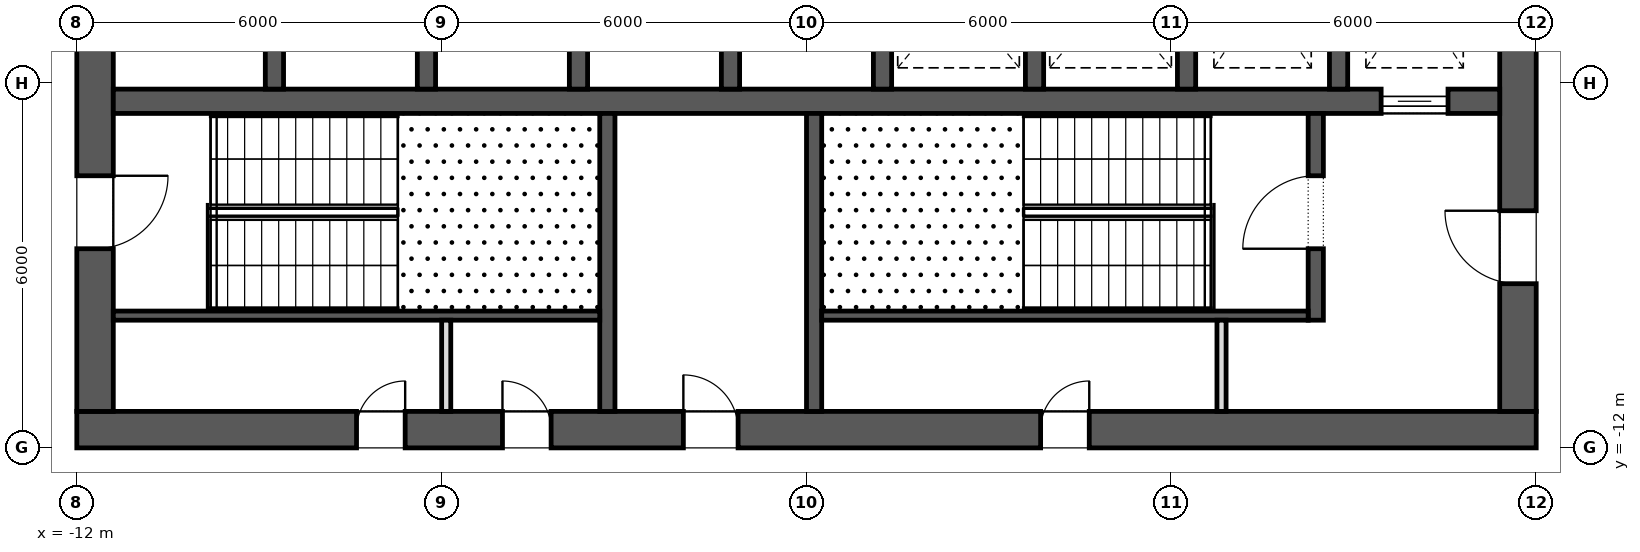
"""IFC4 building model, lengths in metres.
Left out: names, types, materials, properties, quantities, classifications, styles, units other than length and angle.
Written with IfcOpenShell. Run it as: python <this file> out.ifc"""

import sys

from ifc_helpers import new_model, si_unit, direction, frame, frame_2d, origin, place, context, subcontext, project, spatial, rectangle, extrude, element, fill, save


model = new_model("IFC4")
c1 = context("Model", 3, precision=1e-05, world=origin(), true_north=direction((0.0, 1.0)))
c2 = subcontext(c1, "Body", "Model", "MODEL_VIEW")
j1 = project(units=[si_unit("LENGTHUNIT", "METRE"), si_unit("PLANEANGLEUNIT", "RADIAN")], contexts=[c1])
p1 = place(None, origin())
s1 = spatial("IfcSite", under=j1, at=p1, CompositionType="ELEMENT")
p2 = place(p1, origin())
s2 = spatial("IfcBuilding", under=s1, at=p2, CompositionType="ELEMENT")
p3 = place(p2, frame((0.0, 0.0, 129.7)))
s3 = spatial("IfcBuildingStorey", under=s2, at=p3, CompositionType="ELEMENT", Elevation=129.7)
p4 = place(p3, frame((-12.0, -11.7, 0.0), z_axis=(0.0, 0.0, 1.0), x_axis=(1.0, 0.0, 0.0)))
e1 = element("IfcWall", 1, at=p4, inside=s3, PredefinedType="SHEAR", context=c2, shape_type="SweptSolid", body=[
    extrude(rectangle(XDim=24.0, YDim=0.6, at=frame_2d((12.0, 0.0))), origin(), (0.0, 0.0, 1.0), 4.2),
])
p5 = place(p4, frame((9.975, 0.0, 0.0)))
e2 = element("IfcOpeningElement", 2, at=p5, cuts=e1, PredefinedType="OPENING", context=c2, shape_type="SweptSolid", body=[
    extrude(rectangle(XDim=0.9, YDim=2.1, at=frame_2d((0.45, 1.05))), frame((0.0, 0.312, 0.0), z_axis=(0.0, -1.0, 0.0), x_axis=(1.0, 0.0, 0.0)), (0.0, 0.0, 1.0), 0.624),
])
p6 = place(p4, frame((4.6, 0.0, 0.0)))
e3 = element("IfcOpeningElement", 3, at=p6, cuts=e1, PredefinedType="OPENING", context=c2, shape_type="SweptSolid", body=[
    extrude(rectangle(XDim=0.8, YDim=2.1, at=frame_2d((0.4, 1.05))), frame((0.0, 0.312, 0.0), z_axis=(0.0, -1.0, 0.0), x_axis=(1.0, 0.0, 0.0)), (0.0, 0.0, 1.0), 0.624),
])
p7 = place(p4, frame((7.0, 0.0, 0.0)))
e4 = element("IfcOpeningElement", 4, at=p7, cuts=e1, PredefinedType="OPENING", context=c2, shape_type="SweptSolid", body=[
    extrude(rectangle(XDim=0.8, YDim=2.1, at=frame_2d((0.4, 1.05))), frame((0.0, 0.312, 0.0), z_axis=(0.0, -1.0, 0.0), x_axis=(1.0, 0.0, 0.0)), (0.0, 0.0, 1.0), 0.624),
])
p8 = place(p4, frame((15.85, 0.0, 0.0)))
e5 = element("IfcOpeningElement", 5, at=p8, cuts=e1, PredefinedType="OPENING", context=c2, shape_type="SweptSolid", body=[
    extrude(rectangle(XDim=0.8, YDim=2.1, at=frame_2d((0.4, 1.05))), frame((0.0, 0.312, 0.0), z_axis=(0.0, -1.0, 0.0), x_axis=(1.0, 0.0, 0.0)), (0.0, 0.0, 1.0), 0.624),
])
p9 = place(p3, frame((11.7, -11.4, 0.0), z_axis=(0.0, 0.0, 1.0), x_axis=(0.0, 1.0, 0.0)))
e6 = element("IfcWall", 6, at=p9, inside=s3, PredefinedType="SHEAR", context=c2, shape_type="SweptSolid", body=[
    extrude(rectangle(XDim=22.8, YDim=0.6, at=frame_2d((11.4, 0.0))), origin(), (0.0, 0.0, 1.0), 4.2),
])
p10 = place(p9, frame((10.2, 0.0, 0.0)))
e7 = element("IfcOpeningElement", 7, at=p10, cuts=e6, PredefinedType="OPENING", context=c2, shape_type="SweptSolid", body=[
    extrude(rectangle(XDim=2.4, YDim=2.1, at=frame_2d((1.2, 1.05))), frame((0.0, 0.312, 0.0), z_axis=(0.0, -1.0, 0.0), x_axis=(1.0, 0.0, 0.0)), (0.0, 0.0, 1.0), 0.624),
])
p11 = place(p9, frame((19.5, 0.0, 0.0)))
e8 = element("IfcOpeningElement", 8, at=p11, cuts=e6, PredefinedType="OPENING", context=c2, shape_type="SweptSolid", body=[
    extrude(rectangle(XDim=1.2, YDim=2.1, at=frame_2d((0.6, 1.05))), frame((0.0, 0.312, 0.0), z_axis=(0.0, -1.0, 0.0), x_axis=(1.0, 0.0, 0.0)), (0.0, 0.0, 1.0), 0.624),
])
p12 = place(p9, frame((2.1, 0.0, 0.0)))
e9 = element("IfcOpeningElement", 9, at=p12, cuts=e6, PredefinedType="OPENING", context=c2, shape_type="SweptSolid", body=[
    extrude(rectangle(XDim=1.2, YDim=2.1, at=frame_2d((0.6, 1.05))), frame((0.0, 0.312, 0.0), z_axis=(0.0, -1.0, 0.0), x_axis=(1.0, 0.0, 0.0)), (0.0, 0.0, 1.0), 0.624),
])
p13 = place(p3, frame((-11.7, -11.4, 0.0), z_axis=(0.0, 0.0, 1.0), x_axis=(0.0, 1.0, 0.0)))
e10 = element("IfcWall", 10, at=p13, inside=s3, PredefinedType="SHEAR", context=c2, shape_type="SweptSolid", body=[
    extrude(rectangle(XDim=22.8, YDim=0.6, at=frame_2d((11.4, 0.0))), origin(), (0.0, 0.0, 1.0), 4.2),
])
p14 = place(p13, frame((10.2, 0.0, 0.0)))
e11 = element("IfcOpeningElement", 11, at=p14, cuts=e10, PredefinedType="OPENING", context=c2, shape_type="SweptSolid", body=[
    extrude(rectangle(XDim=2.4, YDim=2.1, at=frame_2d((1.2, 1.05))), frame((0.0, 0.312, 0.0), z_axis=(0.0, -1.0, 0.0), x_axis=(1.0, 0.0, 0.0)), (0.0, 0.0, 1.0), 0.624),
])
p15 = place(p13, frame((18.925, 0.0, 0.0)))
e12 = element("IfcOpeningElement", 12, at=p15, cuts=e10, PredefinedType="OPENING", context=c2, shape_type="SweptSolid", body=[
    extrude(rectangle(XDim=1.2, YDim=2.1, at=frame_2d((0.6, 1.05))), frame((0.0, 0.312, 0.0), z_axis=(0.0, -1.0, 0.0), x_axis=(1.0, 0.0, 0.0)), (0.0, 0.0, 1.0), 0.624),
])
p16 = place(p13, frame((2.675, 0.0, 0.0)))
e13 = element("IfcOpeningElement", 13, at=p16, cuts=e10, PredefinedType="OPENING", context=c2, shape_type="SweptSolid", body=[
    extrude(rectangle(XDim=1.2, YDim=2.1, at=frame_2d((0.6, 1.05))), frame((0.0, 0.312, 0.0), z_axis=(0.0, -1.0, 0.0), x_axis=(1.0, 0.0, 0.0)), (0.0, 0.0, 1.0), 0.624),
])
p17 = place(p3, frame((-11.4, -6.3, 0.0), z_axis=(0.0, 0.0, 1.0), x_axis=(1.0, 0.0, 0.0)))
e14 = element("IfcWall", 14, at=p17, inside=s3, PredefinedType="SHEAR", context=c2, shape_type="SweptSolid", body=[
    extrude(rectangle(XDim=22.8, YDim=0.4, at=frame_2d((11.4, 0.0))), origin(), (0.0, 0.0, 1.0), 4.2),
])
p18 = place(p17, frame((20.85, 0.0, 0.0)))
e15 = element("IfcOpeningElement", 15, at=p18, cuts=e14, PredefinedType="OPENING", context=c2, shape_type="SweptSolid", body=[
    extrude(rectangle(XDim=1.1, YDim=2.1, at=frame_2d((0.55, 1.05))), frame((0.0, 0.212, 0.0), z_axis=(0.0, -1.0, 0.0), x_axis=(1.0, 0.0, 0.0)), (0.0, 0.0, 1.0), 0.424),
])
for number, where, z_axis, x_axis in (
    (16, (-8.75, -6.1, 0.0), (0.0, 0.0, 1.0), (0.0, 1.0, 0.0)),
    (17, (-6.25, -6.1, 0.0), (0.0, 0.0, 1.0), (0.0, 1.0, 0.0)),
    (18, (-3.75, -6.1, 0.0), (0.0, 0.0, 1.0), (0.0, 1.0, 0.0)),
    (19, (-1.25, -6.1, 0.0), (0.0, 0.0, 1.0), (0.0, 1.0, 0.0)),
    (20, (1.25, -6.1, 0.0), (0.0, 0.0, 1.0), (0.0, 1.0, 0.0)),
    (21, (3.75, -6.1, 0.0), (0.0, 0.0, 1.0), (0.0, 1.0, 0.0)),
    (22, (6.25, -6.1, 0.0), (0.0, 0.0, 1.0), (0.0, 1.0, 0.0)),
    (23, (8.75, -6.1, 0.0), (0.0, 0.0, 1.0), (0.0, 1.0, 0.0)),
):
    element("IfcWall", number, at=place(p3, frame(where, z_axis=z_axis, x_axis=x_axis)), inside=s3, PredefinedType="SHEAR", context=c2, shape_type="SweptSolid", body=[
        extrude(rectangle(XDim=2.9, YDim=0.3, at=frame_2d((1.45, 0.0))), origin(), (0.0, 0.0, 1.0), 4.2),
    ])
for number, where, z_axis, x_axis in (
    (24, (-3.275, -11.4, 0.0), (0.0, 0.0, 1.0), (0.0, 1.0, 0.0)),
    (25, (0.125, -11.4, 0.0), (0.0, 0.0, 1.0), (0.0, 1.0, 0.0)),
):
    element("IfcWall", number, at=place(p3, frame(where, z_axis=z_axis, x_axis=x_axis)), inside=s3, PredefinedType="SHEAR", context=c2, shape_type="SweptSolid", body=[
        extrude(rectangle(XDim=4.9, YDim=0.25, at=frame_2d((2.45, 0.0))), origin(), (0.0, 0.0, 1.0), 3.9),
    ])
p19 = place(p3, frame((8.375, -9.9, 0.0), z_axis=(0.0, 0.0, 1.0), x_axis=(0.0, 1.0, 0.0)))
e26 = element("IfcWall", 26, at=p19, inside=s3, PredefinedType="SHEAR", context=c2, shape_type="SweptSolid", body=[
    extrude(rectangle(XDim=3.4, YDim=0.25, at=frame_2d((1.7, 0.0))), origin(), (0.0, 0.0, 1.0), 3.9),
])
p20 = place(p19, frame((1.175, 0.0, 0.0)))
e27 = element("IfcOpeningElement", 27, at=p20, cuts=e26, PredefinedType="OPENING", context=c2, shape_type="SweptSolid", body=[
    extrude(rectangle(XDim=1.2, YDim=2.1, at=frame_2d((0.6, 1.05))), frame((0.0, 0.137, 0.0), z_axis=(0.0, -1.0, 0.0), x_axis=(1.0, 0.0, 0.0)), (0.0, 0.0, 1.0), 0.274),
])
for number, where, z_axis, x_axis in (
    (28, (-11.4, -9.825, 0.0), (0.0, 0.0, 1.0), (1.0, 0.0, 0.0)),
    (29, (0.25, -9.825, 0.0), (0.0, 0.0, 1.0), (1.0, 0.0, 0.0)),
):
    element("IfcWall", number, at=place(p3, frame(where, z_axis=z_axis, x_axis=x_axis)), inside=s3, PredefinedType="SHEAR", context=c2, shape_type="SweptSolid", body=[
        extrude(rectangle(XDim=8.0, YDim=0.15, at=frame_2d((4.0, 0.0))), origin(), (0.0, 0.0, 1.0), 3.9),
    ])
for number, where, z_axis, x_axis in (
    (30, (-5.925, -11.4, 0.0), (0.0, 0.0, 1.0), (0.0, 1.0, 0.0)),
    (31, (6.825, -11.4, 0.0), (0.0, 0.0, 1.0), (0.0, 1.0, 0.0)),
):
    element("IfcWall", number, at=place(p3, frame(where, z_axis=z_axis, x_axis=x_axis)), inside=s3, PredefinedType="PARTITIONING", context=c2, shape_type="SweptSolid", body=[
        extrude(rectangle(XDim=1.5, YDim=0.15, at=frame_2d((0.75, 0.0))), origin(), (0.0, 0.0, 1.0), 3.9),
    ])
p21 = place(p18, origin())
e32 = element("IfcDoor", 32, at=p21, inside=s3, OperationType="SLIDING_TO_LEFT", PredefinedType="DOOR", context=c2, shape_type="SweptSolid", body=[
    extrude(rectangle(XDim=1.1, YDim=2.1, at=frame_2d((0.55, 1.05))), frame((0.0, 0.025, 0.0), z_axis=(0.0, -1.0, 0.0), x_axis=(1.0, 0.0, 0.0)), (0.0, 0.0, 1.0), 0.05),
])
fill(e15, e32)
p22 = place(p16, frame((1.2, 0.0, 0.0), z_axis=(0.0, 0.0, 1.0), x_axis=(-1.0, 0.0, 0.0)))
e33 = element("IfcDoor", 33, at=p22, inside=s3, OperationType="SINGLE_SWING_RIGHT", PredefinedType="DOOR", context=c2, shape_type="SweptSolid", body=[
    extrude(rectangle(XDim=1.2, YDim=2.1, at=frame_2d((0.6, 1.05))), frame((0.0, 0.025, 0.0), z_axis=(0.0, -1.0, 0.0), x_axis=(1.0, 0.0, 0.0)), (0.0, 0.0, 1.0), 0.05),
])
fill(e13, e33)
p23 = place(p20, origin())
e34 = element("IfcDoor", 34, at=p23, inside=s3, OperationType="SINGLE_SWING_RIGHT", PredefinedType="DOOR", context=c2, shape_type="SweptSolid", body=[
    extrude(rectangle(XDim=1.2, YDim=2.1, at=frame_2d((0.6, 1.05))), frame((0.0, 0.025, 0.0), z_axis=(0.0, -1.0, 0.0), x_axis=(1.0, 0.0, 0.0)), (0.0, 0.0, 1.0), 0.05),
])
fill(e27, e34)
p24 = place(p12, origin())
e35 = element("IfcDoor", 35, at=p24, inside=s3, OperationType="SINGLE_SWING_LEFT", PredefinedType="DOOR", context=c2, shape_type="SweptSolid", body=[
    extrude(rectangle(XDim=1.2, YDim=2.1, at=frame_2d((0.6, 1.05))), frame((0.0, 0.025, 0.0), z_axis=(0.0, -1.0, 0.0), x_axis=(1.0, 0.0, 0.0)), (0.0, 0.0, 1.0), 0.05),
])
fill(e9, e35)
p25 = place(p5, origin())
e36 = element("IfcDoor", 36, at=p25, inside=s3, OperationType="SINGLE_SWING_RIGHT", PredefinedType="DOOR", context=c2, shape_type="SweptSolid", body=[
    extrude(rectangle(XDim=0.9, YDim=2.1, at=frame_2d((0.45, 1.05))), frame((0.0, 0.025, 0.0), z_axis=(0.0, -1.0, 0.0), x_axis=(1.0, 0.0, 0.0)), (0.0, 0.0, 1.0), 0.05),
])
fill(e2, e36)
p26 = place(p6, origin())
e37 = element("IfcDoor", 37, at=p26, inside=s3, OperationType="SINGLE_SWING_LEFT", PredefinedType="DOOR", context=c2, shape_type="SweptSolid", body=[
    extrude(rectangle(XDim=0.8, YDim=2.1, at=frame_2d((0.4, 1.05))), frame((0.0, 0.025, 0.0), z_axis=(0.0, -1.0, 0.0), x_axis=(1.0, 0.0, 0.0)), (0.0, 0.0, 1.0), 0.05),
])
fill(e3, e37)
p27 = place(p7, origin())
e38 = element("IfcDoor", 38, at=p27, inside=s3, OperationType="SINGLE_SWING_RIGHT", PredefinedType="DOOR", context=c2, shape_type="SweptSolid", body=[
    extrude(rectangle(XDim=0.8, YDim=2.1, at=frame_2d((0.4, 1.05))), frame((0.0, 0.025, 0.0), z_axis=(0.0, -1.0, 0.0), x_axis=(1.0, 0.0, 0.0)), (0.0, 0.0, 1.0), 0.05),
])
fill(e4, e38)
p28 = place(p8, origin())
e39 = element("IfcDoor", 39, at=p28, inside=s3, OperationType="SINGLE_SWING_LEFT", PredefinedType="DOOR", context=c2, shape_type="SweptSolid", body=[
    extrude(rectangle(XDim=0.8, YDim=2.1, at=frame_2d((0.4, 1.05))), frame((0.0, 0.025, 0.0), z_axis=(0.0, -1.0, 0.0), x_axis=(1.0, 0.0, 0.0)), (0.0, 0.0, 1.0), 0.05),
])
fill(e5, e39)
save(model, sys.argv[1])
